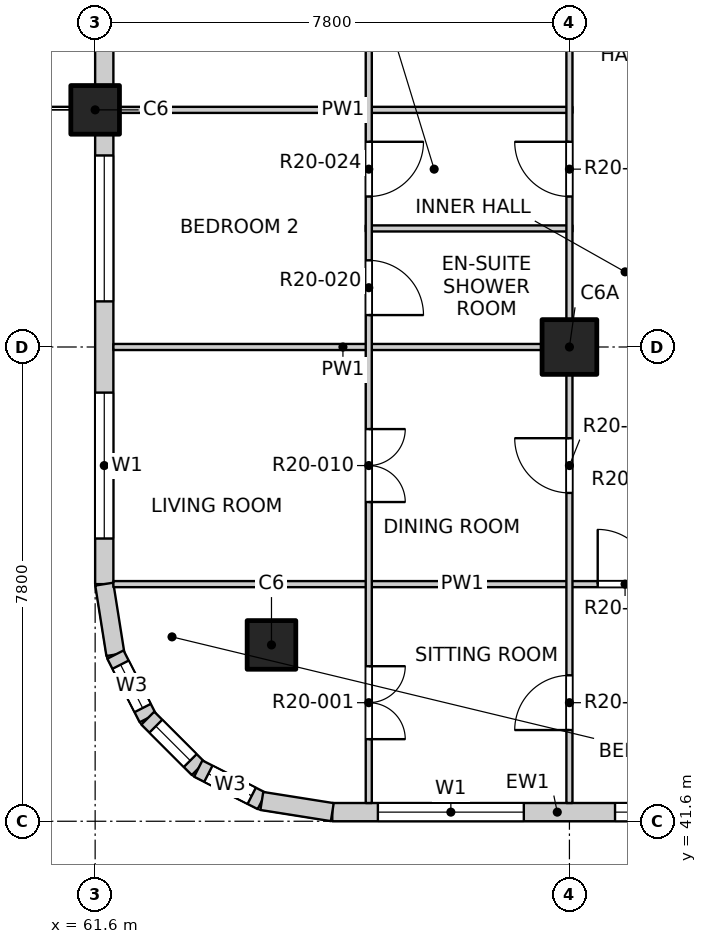
"""IFC4 building model, lengths in metres.
Left out: names, types, materials, properties, quantities, classifications, styles, units other than length and angle.
Written with IfcOpenShell. Run it as: python <this file> out.ifc"""

import sys

from ifc_helpers import new_model, si_unit, direction, frame, frame_2d, origin, origin_2d, place, context, subcontext, project, spatial, rectangle, extrude, element, fill, save


model = new_model("IFC4")
c1 = context("Model", 3, precision=1e-05, world=origin(), true_north=direction((0.0, 1.0)))
c2 = subcontext(c1, "Body", "Model", "MODEL_VIEW")
j1 = project(units=[si_unit("LENGTHUNIT", "METRE"), si_unit("PLANEANGLEUNIT", "RADIAN")], contexts=[c1])
p1 = place(None, origin())
s1 = spatial("IfcSite", under=j1, at=p1, CompositionType="ELEMENT")
p2 = place(p1, origin())
s2 = spatial("IfcBuilding", under=s1, at=p2, CompositionType="ELEMENT")
p3 = place(p2, frame((0.0, 0.0, 204.1)))
s3 = spatial("IfcBuildingStorey", under=s2, at=p3, CompositionType="ELEMENT", Elevation=204.1)
for number, where, z_axis, x_axis in (
    (1, (64.5, 44.5, -0.25), (0.0, 0.0, 1.0), (1.0, 0.0, 0.0)),
    (2, (61.6, 53.3, -0.25), (0.0, 0.0, 1.0), (1.0, 0.0, 0.0)),
):
    element("IfcColumn", number, at=place(p3, frame(where, z_axis=z_axis, x_axis=x_axis)), inside=s3, PredefinedType="COLUMN", context=c2, shape_type="SweptSolid", body=[
        extrude(rectangle(XDim=0.8, YDim=0.8, at=origin_2d()), origin(), (0.0, 0.0, 1.0), 3.4),
    ])
p4 = place(p3, frame((69.4, 49.4, -0.25), z_axis=(0.0, 0.0, 1.0), x_axis=(1.0, 0.0, 0.0)))
e3 = element("IfcColumn", 3, at=p4, inside=s3, PredefinedType="COLUMN", context=c2, shape_type="SweptSolid", body=[
    extrude(rectangle(XDim=0.9, YDim=0.9, at=origin_2d()), origin(), (0.0, 0.0, 1.0), 3.4),
])
p5 = place(p3, frame((65.5, 41.75, 0.0), z_axis=(0.0, 0.0, 1.0), x_axis=(1.0, 0.0, 0.0)))
e4 = element("IfcWall", 4, at=p5, inside=s3, PredefinedType="SOLIDWALL", context=c2, shape_type="SweptSolid", body=[
    extrude(rectangle(XDim=7.4, YDim=0.3, at=frame_2d((3.7, 0.0))), origin(), (0.0, 0.0, 1.0), 2.7),
])
p6 = place(p5, frame((0.75, 0.0, 0.9)))
e5 = element("IfcOpeningElement", 5, at=p6, cuts=e4, PredefinedType="OPENING", context=c2, shape_type="SweptSolid", body=[
    extrude(rectangle(XDim=2.4, YDim=1.8, at=frame_2d((1.2, 0.9))), frame((0.0, 0.16, 0.0), z_axis=(0.0, -1.0, 0.0), x_axis=(1.0, 0.0, 0.0)), (0.0, 0.0, 1.0), 0.32),
])
p7 = place(p5, frame((4.65, 0.0, 0.9)))
e6 = element("IfcOpeningElement", 6, at=p7, cuts=e4, PredefinedType="OPENING", context=c2, shape_type="SweptSolid", body=[
    extrude(rectangle(XDim=2.4, YDim=1.8, at=frame_2d((1.2, 0.9))), frame((0.0, 0.16, 0.0), z_axis=(0.0, -1.0, 0.0), x_axis=(1.0, 0.0, 0.0)), (0.0, 0.0, 1.0), 0.32),
])
p8 = place(p3, frame((61.75, 45.5, 0.0), z_axis=(0.0, 0.0, 1.0), x_axis=(0.0, 1.0, 0.0)))
e7 = element("IfcWall", 7, at=p8, inside=s3, PredefinedType="SOLIDWALL", context=c2, shape_type="SweptSolid", body=[
    extrude(rectangle(XDim=7.4, YDim=0.3, at=frame_2d((3.7, 0.0))), origin(), (0.0, 0.0, 1.0), 2.7),
])
p9 = place(p8, frame((0.75, 0.0, 0.9)))
e8 = element("IfcOpeningElement", 8, at=p9, cuts=e7, PredefinedType="OPENING", context=c2, shape_type="SweptSolid", body=[
    extrude(rectangle(XDim=2.4, YDim=1.8, at=frame_2d((1.2, 0.9))), frame((0.0, 0.16, 0.0), z_axis=(0.0, -1.0, 0.0), x_axis=(1.0, 0.0, 0.0)), (0.0, 0.0, 1.0), 0.32),
])
p10 = place(p8, frame((4.65, 0.0, 0.9)))
e9 = element("IfcOpeningElement", 9, at=p10, cuts=e7, PredefinedType="OPENING", context=c2, shape_type="SweptSolid", body=[
    extrude(rectangle(XDim=2.4, YDim=1.8, at=frame_2d((1.2, 0.9))), frame((0.0, 0.16, 0.0), z_axis=(0.0, -1.0, 0.0), x_axis=(1.0, 0.0, 0.0)), (0.0, 0.0, 1.0), 0.32),
])
p11 = place(p3, frame((61.75, 53.7, 0.0), z_axis=(0.0, 0.0, 1.0), x_axis=(0.0, 1.0, 0.0)))
e10 = element("IfcWall", 10, at=p11, inside=s3, PredefinedType="SOLIDWALL", context=c2, shape_type="SweptSolid", body=[
    extrude(rectangle(XDim=7.0, YDim=0.3, at=frame_2d((3.5, 0.0))), origin(), (0.0, 0.0, 1.0), 2.7),
])
p12 = place(p11, frame((0.65, 0.0, 0.0)))
e11 = element("IfcOpeningElement", 11, at=p12, cuts=e10, PredefinedType="OPENING", context=c2, shape_type="SweptSolid", body=[
    extrude(rectangle(XDim=1.8, YDim=2.4, at=frame_2d((0.9, 1.2))), frame((0.0, 0.16, 0.0), z_axis=(0.0, -1.0, 0.0), x_axis=(1.0, 0.0, 0.0)), (0.0, 0.0, 1.0), 0.32),
])
p13 = place(p11, frame((4.25, 0.0, 0.9)))
e12 = element("IfcOpeningElement", 12, at=p13, cuts=e10, PredefinedType="OPENING", context=c2, shape_type="SweptSolid", body=[
    extrude(rectangle(XDim=2.4, YDim=1.8, at=frame_2d((1.2, 0.9))), frame((0.0, 0.16, 0.0), z_axis=(0.0, -1.0, 0.0), x_axis=(1.0, 0.0, 0.0)), (0.0, 0.0, 1.0), 0.32),
])
p14 = place(p3, frame((61.75, 45.5, 0.0), z_axis=(0.0, 0.0, 1.0), x_axis=(0.156496880861, -0.987678452879, 0.0)))
e13 = element("IfcWall", 13, at=p14, inside=s3, PredefinedType="SOLIDWALL", context=c2, shape_type="SweptSolid", body=[
    extrude(rectangle(XDim=1.173, YDim=0.3, at=frame_2d((0.586, 0.0))), origin(), (0.0, 0.0, 1.0), 2.7),
])
p15 = place(p3, frame((61.934, 44.341, 0.0), z_axis=(0.0, 0.0, 1.0), x_axis=(0.454025524128, -0.890988677504, 0.0)))
e14 = element("IfcWall", 14, at=p15, inside=s3, PredefinedType="SOLIDWALL", context=c2, shape_type="SweptSolid", body=[
    extrude(rectangle(XDim=1.173, YDim=0.3, at=frame_2d((0.587, 0.0))), origin(), (0.0, 0.0, 1.0), 2.7),
])
p16 = place(p15, frame((0.187, 0.0, 0.9)))
e15 = element("IfcOpeningElement", 15, at=p16, cuts=e14, PredefinedType="OPENING", context=c2, shape_type="SweptSolid", body=[
    extrude(rectangle(XDim=0.8, YDim=1.2, at=frame_2d((0.4, 0.6))), frame((0.0, 0.16, 0.0), z_axis=(0.0, -1.0, 0.0), x_axis=(1.0, 0.0, 0.0)), (0.0, 0.0, 1.0), 0.32),
])
p17 = place(p3, frame((62.466, 43.296, 0.0), z_axis=(0.0, 0.0, 1.0), x_axis=(0.707106781187, -0.707106781187, 0.0)))
e16 = element("IfcWall", 16, at=p17, inside=s3, PredefinedType="SOLIDWALL", context=c2, shape_type="SweptSolid", body=[
    extrude(rectangle(XDim=1.173, YDim=0.3, at=frame_2d((0.586, 0.0))), origin(), (0.0, 0.0, 1.0), 2.7),
])
p18 = place(p17, frame((0.187, 0.0, 0.9)))
e17 = element("IfcOpeningElement", 17, at=p18, cuts=e16, PredefinedType="OPENING", context=c2, shape_type="SweptSolid", body=[
    extrude(rectangle(XDim=0.8, YDim=1.2, at=frame_2d((0.4, 0.6))), frame((0.0, 0.16, 0.0), z_axis=(0.0, -1.0, 0.0), x_axis=(1.0, 0.0, 0.0)), (0.0, 0.0, 1.0), 0.32),
])
p19 = place(p3, frame((63.296, 42.466, 0.0), z_axis=(0.0, 0.0, 1.0), x_axis=(0.890988677504, -0.454025524128, 0.0)))
e18 = element("IfcWall", 18, at=p19, inside=s3, PredefinedType="SOLIDWALL", context=c2, shape_type="SweptSolid", body=[
    extrude(rectangle(XDim=1.173, YDim=0.3, at=frame_2d((0.587, 0.0))), origin(), (0.0, 0.0, 1.0), 2.7),
])
p20 = place(p19, frame((0.187, 0.0, 0.9)))
e19 = element("IfcOpeningElement", 19, at=p20, cuts=e18, PredefinedType="OPENING", context=c2, shape_type="SweptSolid", body=[
    extrude(rectangle(XDim=0.8, YDim=1.2, at=frame_2d((0.4, 0.6))), frame((0.0, 0.16, 0.0), z_axis=(0.0, -1.0, 0.0), x_axis=(1.0, 0.0, 0.0)), (0.0, 0.0, 1.0), 0.32),
])
p21 = place(p3, frame((64.341, 41.934, 0.0), z_axis=(0.0, 0.0, 1.0), x_axis=(0.987678452879, -0.156496880861, 0.0)))
e20 = element("IfcWall", 20, at=p21, inside=s3, PredefinedType="SOLIDWALL", context=c2, shape_type="SweptSolid", body=[
    extrude(rectangle(XDim=1.173, YDim=0.3, at=frame_2d((0.586, 0.0))), origin(), (0.0, 0.0, 1.0), 2.7),
])
p22 = place(p3, frame((61.9, 45.5, 0.0), z_axis=(0.0, 0.0, 1.0), x_axis=(1.0, 0.0, 0.0)))
e21 = element("IfcWall", 21, at=p22, inside=s3, PredefinedType="PARTITIONING", context=c2, shape_type="SweptSolid", body=[
    extrude(rectangle(XDim=11.475, YDim=0.1, at=frame_2d((5.737, 0.0))), origin(), (0.0, 0.0, 1.0), 3.15),
])
p23 = place(p22, frame((7.965, 0.0, 0.0)))
e22 = element("IfcOpeningElement", 22, at=p23, cuts=e21, PredefinedType="OPENING", context=c2, shape_type="SweptSolid", body=[
    extrude(rectangle(XDim=0.9, YDim=2.1, at=frame_2d((0.45, 1.05))), frame((0.0, 0.06, 0.0), z_axis=(0.0, -1.0, 0.0), x_axis=(1.0, 0.0, 0.0)), (0.0, 0.0, 1.0), 0.12),
])
p24 = place(p3, frame((61.9, 49.4, 0.0), z_axis=(0.0, 0.0, 1.0), x_axis=(1.0, 0.0, 0.0)))
e23 = element("IfcWall", 23, at=p24, inside=s3, PredefinedType="PARTITIONING", context=c2, shape_type="SweptSolid", body=[
    extrude(rectangle(XDim=7.55, YDim=0.1, at=frame_2d((3.775, 0.0))), origin(), (0.0, 0.0, 1.0), 3.15),
])
p25 = place(p3, frame((66.05, 51.35, 0.0), z_axis=(0.0, 0.0, 1.0), x_axis=(1.0, 0.0, 0.0)))
e24 = element("IfcWall", 24, at=p25, inside=s3, PredefinedType="PARTITIONING", context=c2, shape_type="SweptSolid", body=[
    extrude(rectangle(XDim=3.4, YDim=0.1, at=frame_2d((1.7, 0.0))), origin(), (0.0, 0.0, 1.0), 3.15),
])
p26 = place(p3, frame((61.9, 53.3, 0.0), z_axis=(0.0, 0.0, 1.0), x_axis=(1.0, 0.0, 0.0)))
e25 = element("IfcWall", 25, at=p26, inside=s3, PredefinedType="PARTITIONING", context=c2, shape_type="SweptSolid", body=[
    extrude(rectangle(XDim=7.55, YDim=0.1, at=frame_2d((3.775, 0.0))), origin(), (0.0, 0.0, 1.0), 3.15),
])
p27 = place(p3, frame((66.1, 41.9, 0.0), z_axis=(0.0, 0.0, 1.0), x_axis=(0.0, 1.0, 0.0)))
e26 = element("IfcWall", 26, at=p27, inside=s3, PredefinedType="PARTITIONING", context=c2, shape_type="SweptSolid", body=[
    extrude(rectangle(XDim=19.1, YDim=0.1, at=frame_2d((9.55, 0.0))), origin(), (0.0, 0.0, 1.0), 3.15),
])
p28 = place(p27, frame((1.05, 0.0, 0.0)))
e27 = element("IfcOpeningElement", 27, at=p28, cuts=e26, PredefinedType="OPENING", context=c2, shape_type="SweptSolid", body=[
    extrude(rectangle(XDim=1.2, YDim=2.1, at=frame_2d((0.6, 1.05))), frame((0.0, 0.06, 0.0), z_axis=(0.0, -1.0, 0.0), x_axis=(1.0, 0.0, 0.0)), (0.0, 0.0, 1.0), 0.12),
])
p29 = place(p27, frame((4.95, 0.0, 0.0)))
e28 = element("IfcOpeningElement", 28, at=p29, cuts=e26, PredefinedType="OPENING", context=c2, shape_type="SweptSolid", body=[
    extrude(rectangle(XDim=1.2, YDim=2.1, at=frame_2d((0.6, 1.05))), frame((0.0, 0.06, 0.0), z_axis=(0.0, -1.0, 0.0), x_axis=(1.0, 0.0, 0.0)), (0.0, 0.0, 1.0), 0.12),
])
p30 = place(p27, frame((8.025, 0.0, 0.0)))
e29 = element("IfcOpeningElement", 29, at=p30, cuts=e26, PredefinedType="OPENING", context=c2, shape_type="SweptSolid", body=[
    extrude(rectangle(XDim=0.9, YDim=2.1, at=frame_2d((0.45, 1.05))), frame((0.0, 0.06, 0.0), z_axis=(0.0, -1.0, 0.0), x_axis=(1.0, 0.0, 0.0)), (0.0, 0.0, 1.0), 0.12),
])
p31 = place(p27, frame((9.975, 0.0, 0.0)))
e30 = element("IfcOpeningElement", 30, at=p31, cuts=e26, PredefinedType="OPENING", context=c2, shape_type="SweptSolid", body=[
    extrude(rectangle(XDim=0.9, YDim=2.1, at=frame_2d((0.45, 1.05))), frame((0.0, 0.06, 0.0), z_axis=(0.0, -1.0, 0.0), x_axis=(1.0, 0.0, 0.0)), (0.0, 0.0, 1.0), 0.12),
])
p32 = place(p27, frame((12.75, 0.0, 0.0)))
e31 = element("IfcOpeningElement", 31, at=p32, cuts=e26, PredefinedType="OPENING", context=c2, shape_type="SweptSolid", body=[
    extrude(rectangle(XDim=1.2, YDim=2.1, at=frame_2d((0.6, 1.05))), frame((0.0, 0.06, 0.0), z_axis=(0.0, -1.0, 0.0), x_axis=(1.0, 0.0, 0.0)), (0.0, 0.0, 1.0), 0.12),
])
p33 = place(p27, frame((15.825, 0.0, 0.0)))
e32 = element("IfcOpeningElement", 32, at=p33, cuts=e26, PredefinedType="OPENING", context=c2, shape_type="SweptSolid", body=[
    extrude(rectangle(XDim=0.9, YDim=2.1, at=frame_2d((0.45, 1.05))), frame((0.0, 0.06, 0.0), z_axis=(0.0, -1.0, 0.0), x_axis=(1.0, 0.0, 0.0)), (0.0, 0.0, 1.0), 0.12),
])
p34 = place(p27, frame((17.775, 0.0, 0.0)))
e33 = element("IfcOpeningElement", 33, at=p34, cuts=e26, PredefinedType="OPENING", context=c2, shape_type="SweptSolid", body=[
    extrude(rectangle(XDim=0.9, YDim=2.1, at=frame_2d((0.45, 1.05))), frame((0.0, 0.06, 0.0), z_axis=(0.0, -1.0, 0.0), x_axis=(1.0, 0.0, 0.0)), (0.0, 0.0, 1.0), 0.12),
])
p35 = place(p3, frame((69.4, 41.9, 0.0), z_axis=(0.0, 0.0, 1.0), x_axis=(0.0, 1.0, 0.0)))
e34 = element("IfcWall", 34, at=p35, inside=s3, PredefinedType="PARTITIONING", context=c2, shape_type="SweptSolid", body=[
    extrude(rectangle(XDim=46.2, YDim=0.1, at=frame_2d((23.1, 0.0))), origin(), (0.0, 0.0, 1.0), 3.15),
])
p36 = place(p35, frame((1.2, 0.0, 0.0)))
e35 = element("IfcOpeningElement", 35, at=p36, cuts=e34, PredefinedType="OPENING", context=c2, shape_type="SweptSolid", body=[
    extrude(rectangle(XDim=0.9, YDim=2.1, at=frame_2d((0.45, 1.05))), frame((0.0, 0.06, 0.0), z_axis=(0.0, -1.0, 0.0), x_axis=(1.0, 0.0, 0.0)), (0.0, 0.0, 1.0), 0.12),
])
p37 = place(p35, frame((5.1, 0.0, 0.0)))
e36 = element("IfcOpeningElement", 36, at=p37, cuts=e34, PredefinedType="OPENING", context=c2, shape_type="SweptSolid", body=[
    extrude(rectangle(XDim=0.9, YDim=2.1, at=frame_2d((0.45, 1.05))), frame((0.0, 0.06, 0.0), z_axis=(0.0, -1.0, 0.0), x_axis=(1.0, 0.0, 0.0)), (0.0, 0.0, 1.0), 0.12),
])
p38 = place(p35, frame((9.975, 0.0, 0.0)))
e37 = element("IfcOpeningElement", 37, at=p38, cuts=e34, PredefinedType="OPENING", context=c2, shape_type="SweptSolid", body=[
    extrude(rectangle(XDim=0.9, YDim=2.1, at=frame_2d((0.45, 1.05))), frame((0.0, 0.06, 0.0), z_axis=(0.0, -1.0, 0.0), x_axis=(1.0, 0.0, 0.0)), (0.0, 0.0, 1.0), 0.12),
])
p39 = place(p35, frame((12.9, 0.0, 0.0)))
e38 = element("IfcOpeningElement", 38, at=p39, cuts=e34, PredefinedType="OPENING", context=c2, shape_type="SweptSolid", body=[
    extrude(rectangle(XDim=0.9, YDim=2.1, at=frame_2d((0.45, 1.05))), frame((0.0, 0.06, 0.0), z_axis=(0.0, -1.0, 0.0), x_axis=(1.0, 0.0, 0.0)), (0.0, 0.0, 1.0), 0.12),
])
p40 = place(p35, frame((17.775, 0.0, 0.0)))
e39 = element("IfcOpeningElement", 39, at=p40, cuts=e34, PredefinedType="OPENING", context=c2, shape_type="SweptSolid", body=[
    extrude(rectangle(XDim=0.9, YDim=2.1, at=frame_2d((0.45, 1.05))), frame((0.0, 0.06, 0.0), z_axis=(0.0, -1.0, 0.0), x_axis=(1.0, 0.0, 0.0)), (0.0, 0.0, 1.0), 0.12),
])
p41 = place(p35, frame((21.625, 0.0, 0.0)))
e40 = element("IfcOpeningElement", 40, at=p41, cuts=e34, PredefinedType="OPENING", context=c2, shape_type="SweptSolid", body=[
    extrude(rectangle(XDim=0.9, YDim=2.1, at=frame_2d((0.45, 1.05))), frame((0.0, 0.06, 0.0), z_axis=(0.0, -1.0, 0.0), x_axis=(1.0, 0.0, 0.0)), (0.0, 0.0, 1.0), 0.12),
])
p42 = place(p35, frame((24.6, 0.0, 0.0)))
e41 = element("IfcOpeningElement", 41, at=p42, cuts=e34, PredefinedType="OPENING", context=c2, shape_type="SweptSolid", body=[
    extrude(rectangle(XDim=0.9, YDim=2.1, at=frame_2d((0.45, 1.05))), frame((0.0, 0.06, 0.0), z_axis=(0.0, -1.0, 0.0), x_axis=(1.0, 0.0, 0.0)), (0.0, 0.0, 1.0), 0.12),
])
p43 = place(p35, frame((28.5, 0.0, 0.0)))
e42 = element("IfcOpeningElement", 42, at=p43, cuts=e34, PredefinedType="OPENING", context=c2, shape_type="SweptSolid", body=[
    extrude(rectangle(XDim=0.9, YDim=2.1, at=frame_2d((0.45, 1.05))), frame((0.0, 0.06, 0.0), z_axis=(0.0, -1.0, 0.0), x_axis=(1.0, 0.0, 0.0)), (0.0, 0.0, 1.0), 0.12),
])
p44 = place(p35, frame((33.375, 0.0, 0.0)))
e43 = element("IfcOpeningElement", 43, at=p44, cuts=e34, PredefinedType="OPENING", context=c2, shape_type="SweptSolid", body=[
    extrude(rectangle(XDim=0.9, YDim=2.1, at=frame_2d((0.45, 1.05))), frame((0.0, 0.06, 0.0), z_axis=(0.0, -1.0, 0.0), x_axis=(1.0, 0.0, 0.0)), (0.0, 0.0, 1.0), 0.12),
])
p45 = place(p35, frame((37.225, 0.0, 0.0)))
e44 = element("IfcOpeningElement", 44, at=p45, cuts=e34, PredefinedType="OPENING", context=c2, shape_type="SweptSolid", body=[
    extrude(rectangle(XDim=0.9, YDim=2.1, at=frame_2d((0.45, 1.05))), frame((0.0, 0.06, 0.0), z_axis=(0.0, -1.0, 0.0), x_axis=(1.0, 0.0, 0.0)), (0.0, 0.0, 1.0), 0.12),
])
p46 = place(p35, frame((40.2, 0.0, 0.0)))
e45 = element("IfcOpeningElement", 45, at=p46, cuts=e34, PredefinedType="OPENING", context=c2, shape_type="SweptSolid", body=[
    extrude(rectangle(XDim=0.9, YDim=2.1, at=frame_2d((0.45, 1.05))), frame((0.0, 0.06, 0.0), z_axis=(0.0, -1.0, 0.0), x_axis=(1.0, 0.0, 0.0)), (0.0, 0.0, 1.0), 0.12),
])
p47 = place(p35, frame((44.1, 0.0, 0.0)))
e46 = element("IfcOpeningElement", 46, at=p47, cuts=e34, PredefinedType="OPENING", context=c2, shape_type="SweptSolid", body=[
    extrude(rectangle(XDim=0.9, YDim=2.1, at=frame_2d((0.45, 1.05))), frame((0.0, 0.06, 0.0), z_axis=(0.0, -1.0, 0.0), x_axis=(1.0, 0.0, 0.0)), (0.0, 0.0, 1.0), 0.12),
])
p48 = place(p6, origin())
e47 = element("IfcWindow", 47, at=p48, inside=s3, PartitioningType="DOUBLE_PANEL_VERTICAL", PredefinedType="WINDOW", context=c2, shape_type="SweptSolid", body=[
    extrude(rectangle(XDim=2.4, YDim=1.8, at=frame_2d((1.2, 0.9))), frame((0.0, 0.03, 0.0), z_axis=(0.0, -1.0, 0.0), x_axis=(1.0, 0.0, 0.0)), (0.0, 0.0, 1.0), 0.06),
])
fill(e5, e47)
p49 = place(p7, origin())
e48 = element("IfcWindow", 48, at=p49, inside=s3, PartitioningType="DOUBLE_PANEL_VERTICAL", PredefinedType="WINDOW", context=c2, shape_type="SweptSolid", body=[
    extrude(rectangle(XDim=2.4, YDim=1.8, at=frame_2d((1.2, 0.9))), frame((0.0, 0.03, 0.0), z_axis=(0.0, -1.0, 0.0), x_axis=(1.0, 0.0, 0.0)), (0.0, 0.0, 1.0), 0.06),
])
fill(e6, e48)
p50 = place(p9, origin())
e49 = element("IfcWindow", 49, at=p50, inside=s3, PartitioningType="DOUBLE_PANEL_VERTICAL", PredefinedType="WINDOW", context=c2, shape_type="SweptSolid", body=[
    extrude(rectangle(XDim=2.4, YDim=1.8, at=frame_2d((1.2, 0.9))), frame((0.0, 0.03, 0.0), z_axis=(0.0, -1.0, 0.0), x_axis=(1.0, 0.0, 0.0)), (0.0, 0.0, 1.0), 0.06),
])
fill(e8, e49)
p51 = place(p10, origin())
e50 = element("IfcWindow", 50, at=p51, inside=s3, PartitioningType="DOUBLE_PANEL_VERTICAL", PredefinedType="WINDOW", context=c2, shape_type="SweptSolid", body=[
    extrude(rectangle(XDim=2.4, YDim=1.8, at=frame_2d((1.2, 0.9))), frame((0.0, 0.03, 0.0), z_axis=(0.0, -1.0, 0.0), x_axis=(1.0, 0.0, 0.0)), (0.0, 0.0, 1.0), 0.06),
])
fill(e9, e50)
p52 = place(p16, origin())
e51 = element("IfcWindow", 51, at=p52, inside=s3, PartitioningType="SINGLE_PANEL", PredefinedType="WINDOW", context=c2, shape_type="SweptSolid", body=[
    extrude(rectangle(XDim=0.8, YDim=1.2, at=frame_2d((0.4, 0.6))), frame((0.0, 0.03, 0.0), z_axis=(0.0, -1.0, 0.0), x_axis=(1.0, 0.0, 0.0)), (0.0, 0.0, 1.0), 0.06),
])
fill(e15, e51)
p53 = place(p18, origin())
e52 = element("IfcWindow", 52, at=p53, inside=s3, PartitioningType="SINGLE_PANEL", PredefinedType="WINDOW", context=c2, shape_type="SweptSolid", body=[
    extrude(rectangle(XDim=0.8, YDim=1.2, at=frame_2d((0.4, 0.6))), frame((0.0, 0.03, 0.0), z_axis=(0.0, -1.0, 0.0), x_axis=(1.0, 0.0, 0.0)), (0.0, 0.0, 1.0), 0.06),
])
fill(e17, e52)
p54 = place(p20, origin())
e53 = element("IfcWindow", 53, at=p54, inside=s3, PartitioningType="SINGLE_PANEL", PredefinedType="WINDOW", context=c2, shape_type="SweptSolid", body=[
    extrude(rectangle(XDim=0.8, YDim=1.2, at=frame_2d((0.4, 0.6))), frame((0.0, 0.03, 0.0), z_axis=(0.0, -1.0, 0.0), x_axis=(1.0, 0.0, 0.0)), (0.0, 0.0, 1.0), 0.06),
])
fill(e19, e53)
p55 = place(p28, origin())
e54 = element("IfcDoor", 54, at=p55, inside=s3, OperationType="DOUBLE_DOOR_SINGLE_SWING", PredefinedType="DOOR", context=c2, shape_type="SweptSolid", body=[
    extrude(rectangle(XDim=1.2, YDim=2.1, at=frame_2d((0.6, 1.05))), frame((0.0, 0.025, 0.0), z_axis=(0.0, -1.0, 0.0), x_axis=(1.0, 0.0, 0.0)), (0.0, 0.0, 1.0), 0.05),
])
fill(e27, e54)
p56 = place(p36, origin())
e55 = element("IfcDoor", 55, at=p56, inside=s3, OperationType="SINGLE_SWING_LEFT", PredefinedType="DOOR", context=c2, shape_type="SweptSolid", body=[
    extrude(rectangle(XDim=0.9, YDim=2.1, at=frame_2d((0.45, 1.05))), frame((0.0, 0.025, 0.0), z_axis=(0.0, -1.0, 0.0), x_axis=(1.0, 0.0, 0.0)), (0.0, 0.0, 1.0), 0.05),
])
fill(e35, e55)
p57 = place(p23, origin())
e56 = element("IfcDoor", 56, at=p57, inside=s3, OperationType="SINGLE_SWING_LEFT", PredefinedType="DOOR", context=c2, shape_type="SweptSolid", body=[
    extrude(rectangle(XDim=0.9, YDim=2.1, at=frame_2d((0.45, 1.05))), frame((0.0, 0.025, 0.0), z_axis=(0.0, -1.0, 0.0), x_axis=(1.0, 0.0, 0.0)), (0.0, 0.0, 1.0), 0.05),
])
fill(e22, e56)
p58 = place(p29, origin())
e57 = element("IfcDoor", 57, at=p58, inside=s3, OperationType="DOUBLE_DOOR_SINGLE_SWING", PredefinedType="DOOR", context=c2, shape_type="SweptSolid", body=[
    extrude(rectangle(XDim=1.2, YDim=2.1, at=frame_2d((0.6, 1.05))), frame((0.0, 0.025, 0.0), z_axis=(0.0, -1.0, 0.0), x_axis=(1.0, 0.0, 0.0)), (0.0, 0.0, 1.0), 0.05),
])
fill(e28, e57)
p59 = place(p37, origin())
e58 = element("IfcDoor", 58, at=p59, inside=s3, OperationType="SINGLE_SWING_RIGHT", PredefinedType="DOOR", context=c2, shape_type="SweptSolid", body=[
    extrude(rectangle(XDim=0.9, YDim=2.1, at=frame_2d((0.45, 1.05))), frame((0.0, 0.025, 0.0), z_axis=(0.0, -1.0, 0.0), x_axis=(1.0, 0.0, 0.0)), (0.0, 0.0, 1.0), 0.05),
])
fill(e36, e58)
p60 = place(p30, origin())
e59 = element("IfcDoor", 59, at=p60, inside=s3, OperationType="SINGLE_SWING_RIGHT", PredefinedType="DOOR", context=c2, shape_type="SweptSolid", body=[
    extrude(rectangle(XDim=0.9, YDim=2.1, at=frame_2d((0.45, 1.05))), frame((0.0, 0.025, 0.0), z_axis=(0.0, -1.0, 0.0), x_axis=(1.0, 0.0, 0.0)), (0.0, 0.0, 1.0), 0.05),
])
fill(e29, e59)
p61 = place(p31, origin())
e60 = element("IfcDoor", 60, at=p61, inside=s3, OperationType="SINGLE_SWING_LEFT", PredefinedType="DOOR", context=c2, shape_type="SweptSolid", body=[
    extrude(rectangle(XDim=0.9, YDim=2.1, at=frame_2d((0.45, 1.05))), frame((0.0, 0.025, 0.0), z_axis=(0.0, -1.0, 0.0), x_axis=(1.0, 0.0, 0.0)), (0.0, 0.0, 1.0), 0.05),
])
fill(e30, e60)
p62 = place(p38, origin())
e61 = element("IfcDoor", 61, at=p62, inside=s3, OperationType="SINGLE_SWING_RIGHT", PredefinedType="DOOR", context=c2, shape_type="SweptSolid", body=[
    extrude(rectangle(XDim=0.9, YDim=2.1, at=frame_2d((0.45, 1.05))), frame((0.0, 0.025, 0.0), z_axis=(0.0, -1.0, 0.0), x_axis=(1.0, 0.0, 0.0)), (0.0, 0.0, 1.0), 0.05),
])
fill(e37, e61)
save(model, sys.argv[1])
